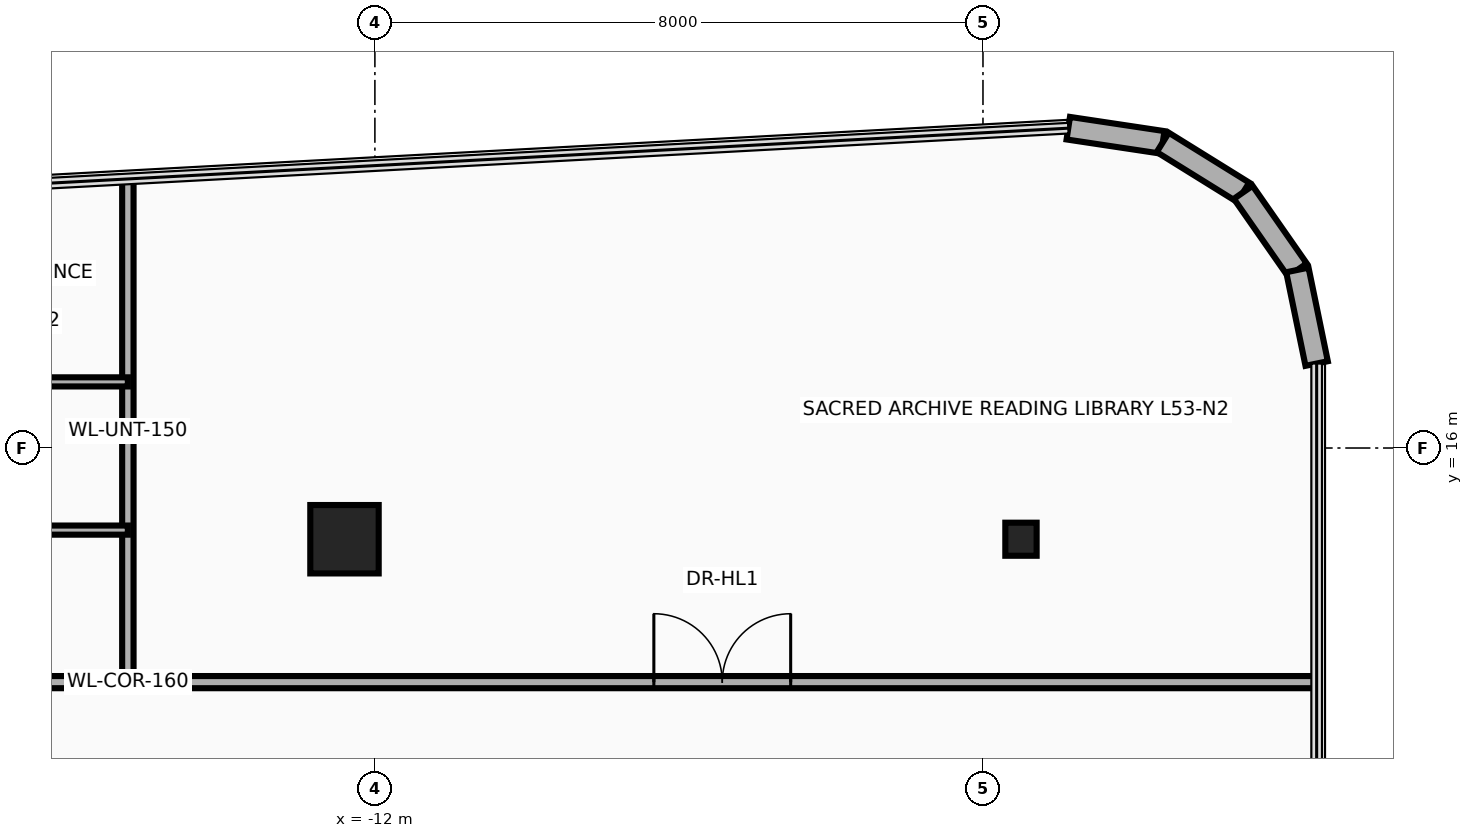
"""IFC4 building model, lengths in metres.
Left out: names, types, materials, properties, quantities, classifications, styles, units other than length and angle.
Written with IfcOpenShell. Run it as: python <this file> out.ifc"""

import sys

from ifc_helpers import new_model, si_unit, direction, frame, frame_2d, origin, origin_2d, place, context, subcontext, project, spatial, rectangle, i_section, extrude, source, transform, mapped, element, fill, save


model = new_model("IFC4")
c1 = context("Model", 3, precision=1e-05, world=origin(), true_north=direction((0.0, 1.0)))
c2 = subcontext(c1, "Body", "Model", "MODEL_VIEW")
j1 = project(units=[si_unit("LENGTHUNIT", "METRE"), si_unit("PLANEANGLEUNIT", "RADIAN")], contexts=[c1])
p1 = place(None, origin())
s1 = spatial("IfcSite", under=j1, at=p1, CompositionType="ELEMENT")
p2 = place(p1, origin())
s2 = spatial("IfcBuilding", under=s1, at=p2, CompositionType="ELEMENT")
p3 = place(p2, frame((0.0, 0.0, 209.0)))
s3 = spatial("IfcBuildingStorey", under=s2, at=p3, CompositionType="ELEMENT", Elevation=209.0)
m1 = source(origin(), c2, "Body", "SweptSolid", [
    extrude(rectangle(XDim=0.9, YDim=0.9, at=origin_2d()), origin(), (0.0, 0.0, 1.0), 3.5),
])
p4 = place(p3, frame((-12.4, 14.8, 0.0), z_axis=(0.0, 0.0, 1.0), x_axis=(1.0, 0.0, 0.0)))
e1 = element("IfcColumn", 1, at=p4, inside=s3, PredefinedType="COLUMN", context=c2, shape_type="MappedRepresentation", body=[
    mapped(m1, transform((0.0, 0.0, 0.0), x_axis=(1.0, 0.0, 0.0), y_axis=(0.0, 1.0, 0.0), z_axis=(0.0, 0.0, 1.0), scale=1.0)),
])
m2 = source(origin(), c2, "Body", "SweptSolid", [
    extrude(i_section(OverallWidth=0.412, OverallDepth=0.435, WebThickness=0.036, FlangeThickness=0.057, at=origin_2d()), origin(), (0.0, 0.0, 1.0), 3.5),
])
p5 = place(p3, frame((-3.5, 14.8, 0.0), z_axis=(0.0, 0.0, 1.0), x_axis=(1.0, 0.0, 0.0)))
e2 = element("IfcColumn", 2, at=p5, inside=s3, PredefinedType="COLUMN", context=c2, shape_type="MappedRepresentation", body=[
    mapped(m2, transform((0.0, 0.0, 0.0), x_axis=(1.0, 0.0, 0.0), y_axis=(0.0, 1.0, 0.0), z_axis=(0.0, 0.0, 1.0), scale=1.0)),
])
p6 = place(p3, frame((-2.878, 20.208, 0.0), z_axis=(0.0, 0.0, 1.0), x_axis=(0.988902138571, -0.148568369208, 0.0)))
e3 = element("IfcWall", 3, at=p6, inside=s3, PredefinedType="SOLIDWALL", context=c2, shape_type="SweptSolid", body=[
    extrude(rectangle(XDim=1.257, YDim=0.3, at=frame_2d((0.628, 0.0))), origin(), (0.0, 0.0, 1.0), 3.26),
])
p7 = place(p3, frame((-1.635, 20.021, 0.0), z_axis=(0.0, 0.0, 1.0), x_axis=(0.849646224094, -0.52735310171, 0.0)))
e4 = element("IfcWall", 4, at=p7, inside=s3, PredefinedType="SOLIDWALL", context=c2, shape_type="SweptSolid", body=[
    extrude(rectangle(XDim=1.245, YDim=0.3, at=frame_2d((0.623, 0.0))), origin(), (0.0, 0.0, 1.0), 3.26),
])
p8 = place(p3, frame((-0.576, 19.364, 0.0), z_axis=(0.0, 0.0, 1.0), x_axis=(0.572304219931, -0.820041389107, 0.0)))
e5 = element("IfcWall", 5, at=p8, inside=s3, PredefinedType="SOLIDWALL", context=c2, shape_type="SweptSolid", body=[
    extrude(rectangle(XDim=1.246, YDim=0.3, at=frame_2d((0.623, 0.0))), origin(), (0.0, 0.0, 1.0), 3.26),
])
p9 = place(p3, frame((0.136, 18.343, 0.0), z_axis=(0.0, 0.0, 1.0), x_axis=(0.201603599025, -0.979467196419, 0.0)))
e6 = element("IfcWall", 6, at=p9, inside=s3, PredefinedType="SOLIDWALL", context=c2, shape_type="SweptSolid", body=[
    extrude(rectangle(XDim=1.257, YDim=0.3, at=frame_2d((0.628, 0.0))), origin(), (0.0, 0.0, 1.0), 3.26),
])
p10 = place(p3, frame((-30.89, 12.92, 0.0), z_axis=(0.0, 0.0, 1.0), x_axis=(1.0, 0.0, 0.0)))
e7 = element("IfcWall", 7, at=p10, inside=s3, PredefinedType="PARTITIONING", context=c2, shape_type="SweptSolid", body=[
    extrude(rectangle(XDim=31.28, YDim=0.16, at=frame_2d((15.64, 0.0))), origin(), (0.0, 0.0, 1.0), 2.634),
])
p11 = place(p10, frame((2.347, 0.0, 0.0)))
e8 = element("IfcOpeningElement", 8, at=p11, cuts=e7, PredefinedType="OPENING", context=c2, shape_type="SweptSolid", body=[
    extrude(rectangle(XDim=0.95, YDim=2.15, at=frame_2d((0.475, 1.075))), frame((0.0, 0.095, 0.0), z_axis=(0.0, -1.0, 0.0), x_axis=(1.0, 0.0, 0.0)), (0.0, 0.0, 1.0), 0.19),
])
p12 = place(p10, frame((22.56, 0.0, 0.0)))
e9 = element("IfcOpeningElement", 9, at=p12, cuts=e7, PredefinedType="OPENING", context=c2, shape_type="SweptSolid", body=[
    extrude(rectangle(XDim=1.8, YDim=2.15, at=frame_2d((0.9, 1.075))), frame((0.0, 0.095, 0.0), z_axis=(0.0, -1.0, 0.0), x_axis=(1.0, 0.0, 0.0)), (0.0, 0.0, 1.0), 0.19),
])
p13 = place(p3, frame((-15.25, 12.92, 0.0), z_axis=(0.0, 0.0, 1.0), x_axis=(0.0, 1.0, 0.0)))
e10 = element("IfcWall", 10, at=p13, inside=s3, PredefinedType="PARTITIONING", context=c2, shape_type="SweptSolid", body=[
    extrude(rectangle(XDim=6.62, YDim=0.15, at=frame_2d((3.31, 0.0))), origin(), (0.0, 0.0, 1.0), 2.544),
])
p14 = place(p3, frame((-25.246, 14.92, 0.0), z_axis=(0.0, 0.0, 1.0), x_axis=(1.0, 0.0, 0.0)))
e11 = element("IfcWall", 11, at=p14, inside=s3, PredefinedType="PARTITIONING", context=c2, shape_type="SweptSolid", body=[
    extrude(rectangle(XDim=9.996, YDim=0.12, at=frame_2d((4.998, 0.0))), origin(), (0.0, 0.0, 1.0), 2.544),
])
p15 = place(p3, frame((-25.246, 16.87, 0.0), z_axis=(0.0, 0.0, 1.0), x_axis=(1.0, 0.0, 0.0)))
e12 = element("IfcWall", 12, at=p15, inside=s3, PredefinedType="PARTITIONING", context=c2, shape_type="SweptSolid", body=[
    extrude(rectangle(XDim=9.996, YDim=0.12, at=frame_2d((4.998, 0.0))), origin(), (0.0, 0.0, 1.0), 3.26),
])
p16 = place(p12, origin())
e13 = element("IfcDoor", 13, at=p16, inside=s3, OperationType="DOUBLE_DOOR_SINGLE_SWING", PredefinedType="DOOR", context=c2, shape_type="SweptSolid", body=[
    extrude(rectangle(XDim=1.8, YDim=2.15, at=frame_2d((0.9, 1.075))), frame((0.0, 0.025, 0.0), z_axis=(0.0, -1.0, 0.0), x_axis=(1.0, 0.0, 0.0)), (0.0, 0.0, 1.0), 0.05),
])
fill(e9, e13)
save(model, sys.argv[1])
